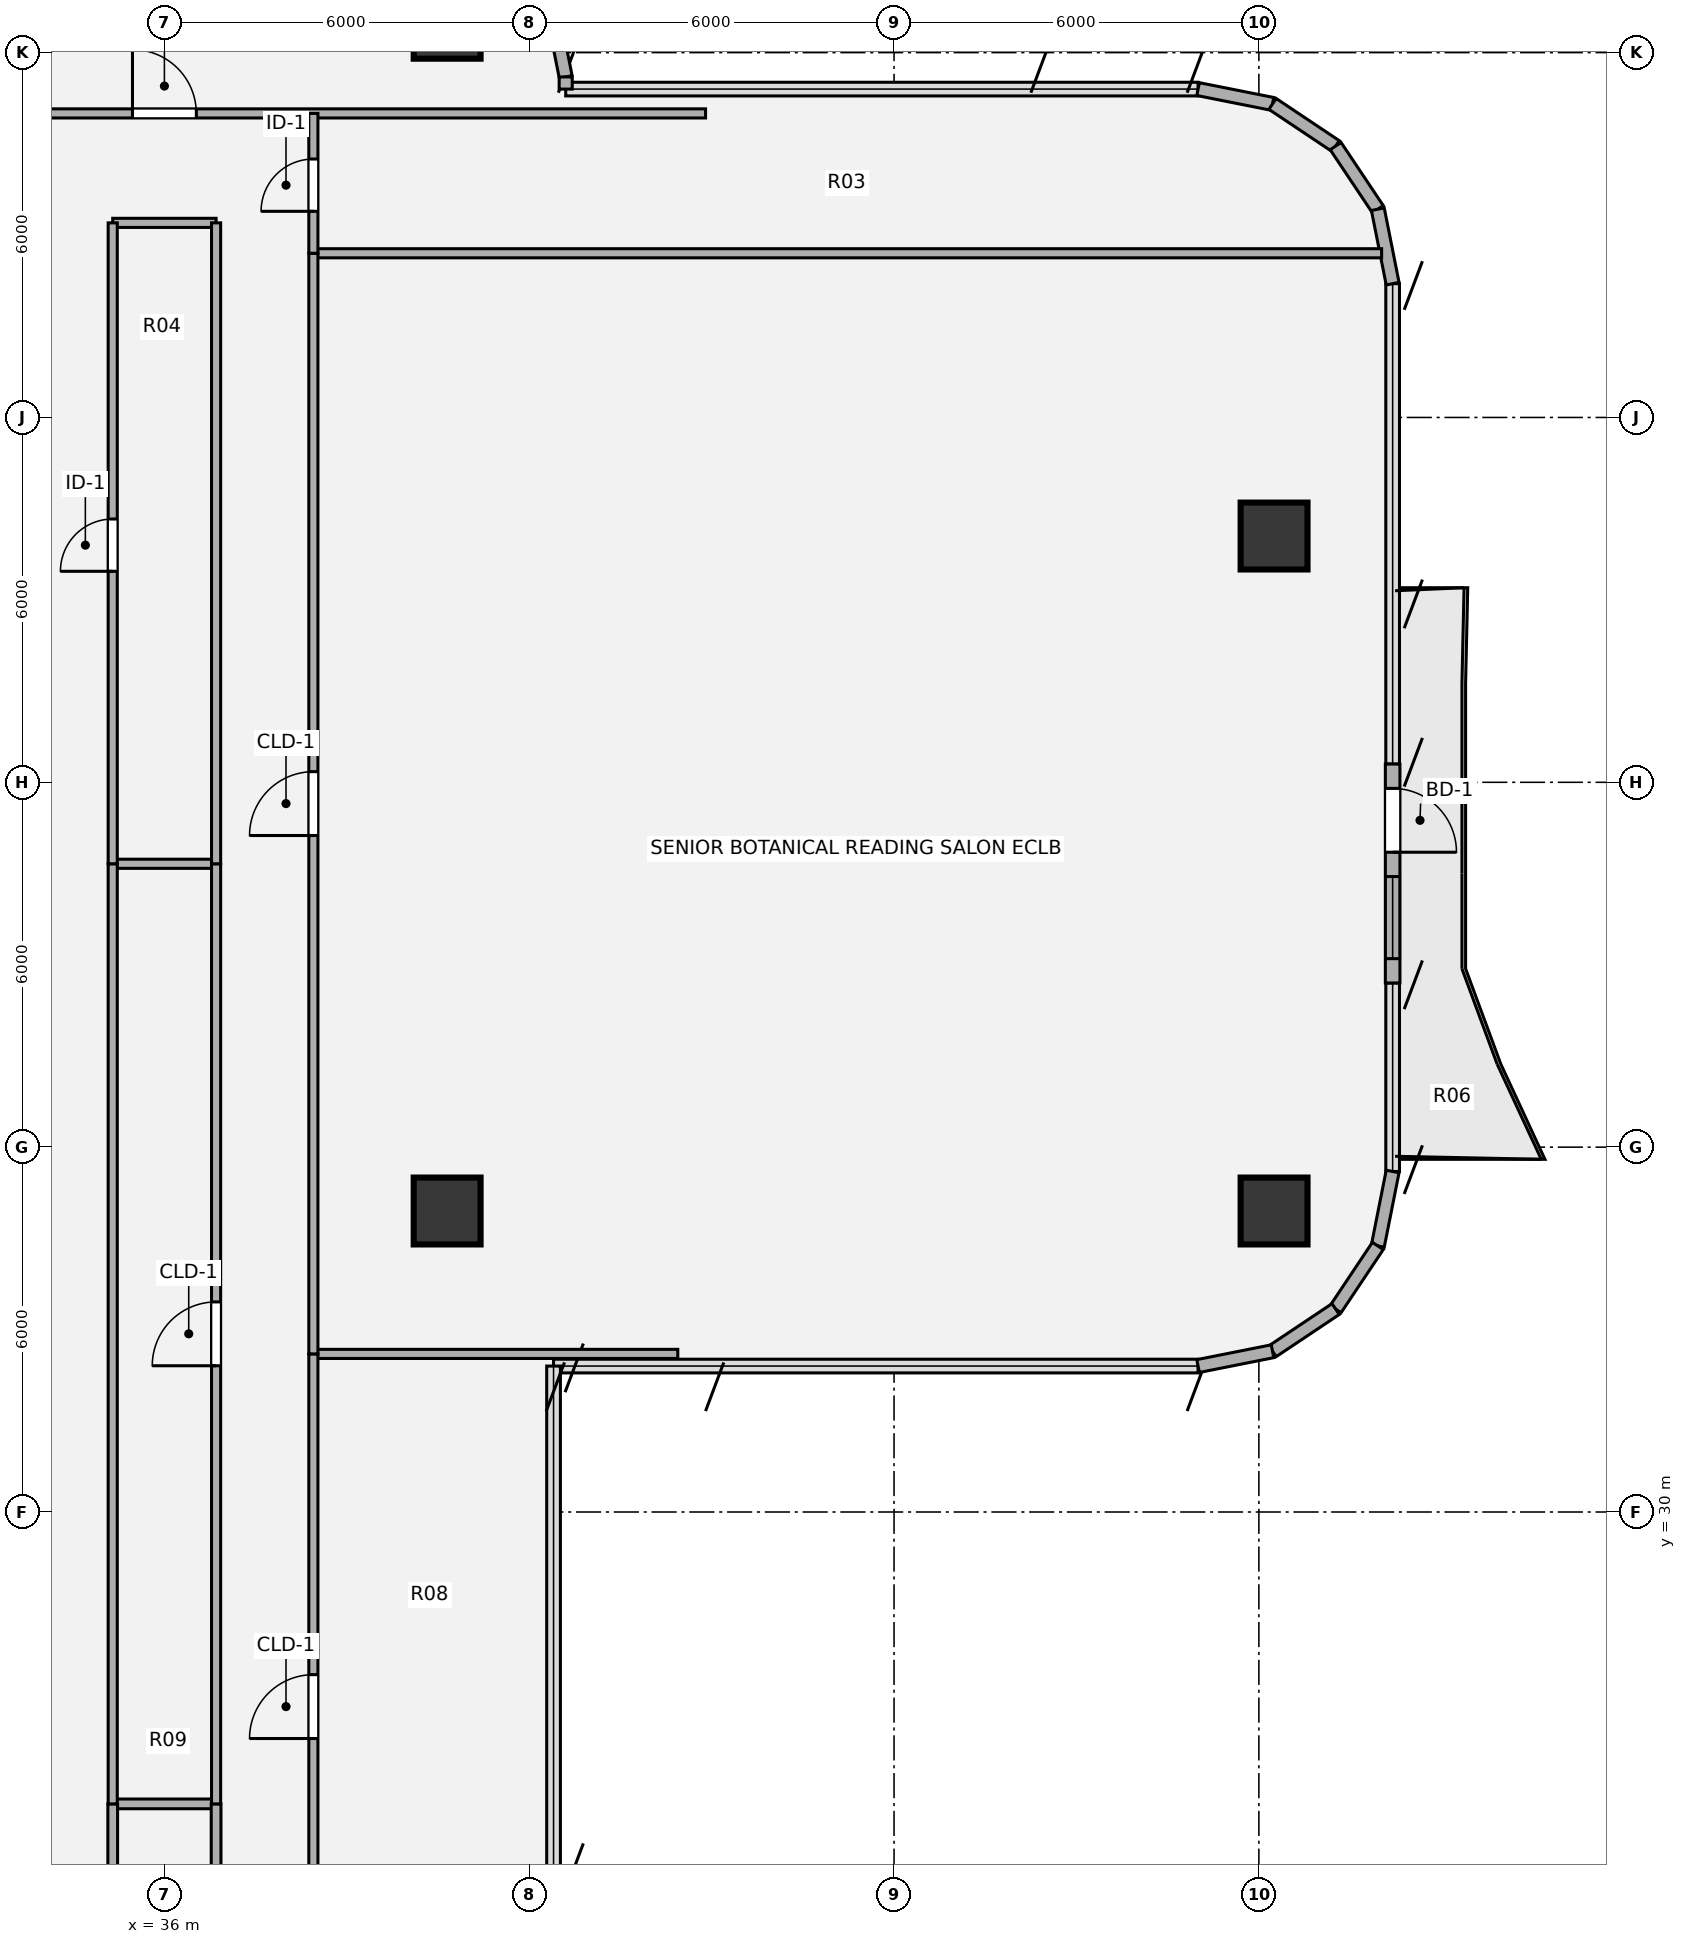
"""IFC4 building model, lengths in metres.
Left out: names, types, materials, properties, quantities, classifications, styles, units other than length and angle.
Written with IfcOpenShell. Run it as: python <this file> out.ifc"""

import sys

from ifc_helpers import new_model, si_unit, direction, frame, frame_2d, origin, origin_2d, place, context, subcontext, project, spatial, rectangle, hollow_circle, extrude, source, transform, mapped, element, fill, save


model = new_model("IFC4")
c1 = context("Model", 3, precision=1e-05, world=origin(), true_north=direction((0.0, 1.0)))
c2 = subcontext(c1, "Body", "Model", "MODEL_VIEW")
j1 = project(units=[si_unit("LENGTHUNIT", "METRE"), si_unit("PLANEANGLEUNIT", "RADIAN")], contexts=[c1])
p1 = place(None, origin())
s1 = spatial("IfcSite", under=j1, at=p1, CompositionType="ELEMENT")
p2 = place(p1, origin())
s2 = spatial("IfcBuilding", under=s1, at=p2, CompositionType="ELEMENT")
p3 = place(p2, frame((0.0, 0.0, 190.44)))
s3 = spatial("IfcBuildingStorey", under=s2, at=p3, CompositionType="ELEMENT", Elevation=190.44)
m1 = source(origin(), c2, "Body", "SweptSolid", [
    extrude(hollow_circle(Radius=0.55, WallThickness=0.04, at=origin_2d()), origin(), (0.0, 0.0, 1.0), 3.78),
])
for number, where, z_axis, x_axis in (
    (1, (54.25, 34.95, 0.0), (0.0, 0.0, 1.0), (1.0, 0.0, 0.0)),
    (2, (54.25, 46.05, 0.0), (0.0, 0.0, 1.0), (1.0, 0.0, 0.0)),
    (3, (40.65, 34.95, 0.0), (0.0, 0.0, 1.0), (1.0, 0.0, 0.0)),
    (4, (40.65, 54.45, 0.0), (0.0, 0.0, 1.0), (1.0, 0.0, 0.0)),
):
    element("IfcColumn", number, at=place(p3, frame(where, z_axis=z_axis, x_axis=x_axis)), inside=s3, PredefinedType="COLUMN", context=c2, shape_type="MappedRepresentation", body=[
        mapped(m1, transform((0.0, 0.0, 0.0), x_axis=(1.0, 0.0, 0.0), y_axis=(0.0, 1.0, 0.0), z_axis=(0.0, 0.0, 1.0), scale=1.0)),
    ])
p4 = place(p3, frame((42.387, 54.671, 0.0), z_axis=(0.0, 0.0, 1.0), x_axis=(0.195127417394, -0.980777900945, 0.0)))
e5 = element("IfcWall", 5, at=p4, inside=s3, PredefinedType="SOLIDWALL", context=c2, shape_type="SweptSolid", body=[
    extrude(rectangle(XDim=1.092, YDim=0.215, at=frame_2d((0.546, 0.0))), origin(), (0.0, 0.0, 1.0), 3.53),
])
p5 = place(p3, frame((42.6, 53.6, 0.0), z_axis=(0.0, 0.0, 1.0), x_axis=(0.0, -1.0, 0.0)))
e6 = element("IfcWall", 6, at=p5, inside=s3, PredefinedType="SOLIDWALL", context=c2, shape_type="SweptSolid", body=[
    extrude(rectangle(XDim=0.2, YDim=0.215, at=frame_2d((0.1, 0.0))), origin(), (0.0, 0.0, 1.0), 3.53),
])
for number, where, z_axis, x_axis in (
    (7, (53.0, 53.4, 0.0), (0.0, 0.0, 1.0), (0.981, -0.195, 0.0)),
    (8, (54.225, 53.156, 0.0), (0.0, 0.0, 1.0), (0.831, -0.556, 0.0)),
    (9, (55.263, 52.463, 0.0), (0.0, 0.0, 1.0), (0.556, -0.831, 0.0)),
    (10, (55.956, 51.425, 0.0), (0.0, 0.0, 1.0), (0.195, -0.981, 0.0)),
):
    element("IfcWall", number, at=place(p3, frame(where, z_axis=z_axis, x_axis=x_axis)), inside=s3, PredefinedType="SOLIDWALL", context=c2, shape_type="SweptSolid", body=[
        extrude(rectangle(XDim=1.249, YDim=0.215, at=frame_2d((0.624, 0.0))), origin(), (0.0, 0.0, 1.0), 3.53),
    ])
p6 = place(p3, frame((56.2, 42.3, 0.0), z_axis=(0.0, 0.0, 1.0), x_axis=(0.0, -1.0, 0.0)))
e11 = element("IfcWall", 11, at=p6, inside=s3, PredefinedType="SOLIDWALL", context=c2, shape_type="SweptSolid", body=[
    extrude(rectangle(XDim=3.6, YDim=0.24, at=frame_2d((1.8, 0.0))), origin(), (0.0, 0.0, 1.0), 3.53),
])
p7 = place(p6, frame((0.4, 0.0, 0.0)))
e12 = element("IfcOpeningElement", 12, at=p7, cuts=e11, PredefinedType="OPENING", context=c2, shape_type="SweptSolid", body=[
    extrude(rectangle(XDim=1.05, YDim=2.15, at=origin_2d()), frame((0.525, 0.13, 1.075), z_axis=(0.0, -1.0, 0.0), x_axis=(1.0, 0.0, 0.0)), (0.0, 0.0, 1.0), 0.26),
])
p8 = place(p6, frame((1.85, 0.0, 0.85)))
e13 = element("IfcOpeningElement", 13, at=p8, cuts=e11, PredefinedType="OPENING", context=c2, shape_type="SweptSolid", body=[
    extrude(rectangle(XDim=1.35, YDim=1.35, at=origin_2d()), frame((0.675, 0.13, 0.675), z_axis=(0.0, -1.0, 0.0), x_axis=(1.0, 0.0, 0.0)), (0.0, 0.0, 1.0), 0.26),
])
for number, where, z_axis, x_axis in (
    (14, (56.2, 35.6, 0.0), (0.0, 0.0, 1.0), (-0.195, -0.981, 0.0)),
    (15, (55.956, 34.375, 0.0), (0.0, 0.0, 1.0), (-0.556, -0.831, 0.0)),
    (16, (55.263, 33.337, 0.0), (0.0, 0.0, 1.0), (-0.831, -0.556, 0.0)),
    (17, (54.225, 32.644, 0.0), (0.0, 0.0, 1.0), (-0.981, -0.195, 0.0)),
):
    element("IfcWall", number, at=place(p3, frame(where, z_axis=z_axis, x_axis=x_axis)), inside=s3, PredefinedType="SOLIDWALL", context=c2, shape_type="SweptSolid", body=[
        extrude(rectangle(XDim=1.249, YDim=0.215, at=frame_2d((0.624, 0.0))), origin(), (0.0, 0.0, 1.0), 3.53),
    ])
p9 = place(p3, frame((35.15, 25.2, 0.0), z_axis=(0.0, 0.0, 1.0), x_axis=(1.0, 0.0, 0.0)))
e18 = element("IfcWall", 18, at=p9, inside=s3, PredefinedType="PLUMBINGWALL", context=c2, shape_type="SweptSolid", body=[
    extrude(rectangle(XDim=1.7, YDim=0.16, at=frame_2d((0.85, 0.0))), origin(), (0.0, 0.0, 1.0), 3.5),
])
p10 = place(p3, frame((38.45, 32.6, 0.0), z_axis=(0.0, 0.0, 1.0), x_axis=(1.0, 0.0, 0.0)))
e19 = element("IfcWall", 19, at=p10, inside=s3, PredefinedType="PARTITIONING", context=c2, shape_type="SweptSolid", body=[
    extrude(rectangle(XDim=5.993, YDim=0.15, at=frame_2d((2.997, 0.0))), origin(), (0.0, 0.0, 1.0), 3.5),
])
p11 = place(p3, frame((35.15, 40.66, 0.0), z_axis=(0.0, 0.0, 1.0), x_axis=(1.0, 0.0, 0.0)))
e20 = element("IfcWall", 20, at=p11, inside=s3, PredefinedType="PARTITIONING", context=c2, shape_type="SweptSolid", body=[
    extrude(rectangle(XDim=1.7, YDim=0.15, at=frame_2d((0.85, 0.0))), origin(), (0.0, 0.0, 1.0), 3.259),
])
p12 = place(p3, frame((38.45, 50.7, 0.0), z_axis=(0.0, 0.0, 1.0), x_axis=(1.0, 0.0, 0.0)))
e21 = element("IfcWall", 21, at=p12, inside=s3, PredefinedType="PARTITIONING", context=c2, shape_type="SweptSolid", body=[
    extrude(rectangle(XDim=17.569, YDim=0.15, at=frame_2d((8.785, 0.0))), origin(), (0.0, 0.0, 1.0), 3.308),
])
p13 = place(p3, frame((35.15, 51.2, 0.0), z_axis=(0.0, 0.0, 1.0), x_axis=(1.0, 0.0, 0.0)))
e22 = element("IfcWall", 22, at=p13, inside=s3, PredefinedType="PARTITIONING", context=c2, shape_type="SweptSolid", body=[
    extrude(rectangle(XDim=1.7, YDim=0.15, at=frame_2d((0.85, 0.0))), origin(), (0.0, 0.0, 1.0), 3.308),
])
p14 = place(p3, frame((27.1, 53.0, 0.0), z_axis=(0.0, 0.0, 1.0), x_axis=(1.0, 0.0, 0.0)))
e23 = element("IfcWall", 23, at=p14, inside=s3, PredefinedType="PARTITIONING", context=c2, shape_type="SweptSolid", body=[
    extrude(rectangle(XDim=17.8, YDim=0.15, at=frame_2d((8.9, 0.0))), origin(), (0.0, 0.0, 1.0), 3.308),
])
p15 = place(p14, frame((8.375, 0.0, 0.0)))
e24 = element("IfcOpeningElement", 24, at=p15, cuts=e23, PredefinedType="OPENING", context=c2, shape_type="SweptSolid", body=[
    extrude(rectangle(XDim=1.05, YDim=2.1, at=origin_2d()), frame((0.525, 0.085, 1.05), z_axis=(0.0, -1.0, 0.0), x_axis=(1.0, 0.0, 0.0)), (0.0, 0.0, 1.0), 0.17),
])
p16 = place(p3, frame((35.15, 20.2, 0.0), z_axis=(0.0, 0.0, 1.0), x_axis=(0.0, 1.0, 0.0)))
e25 = element("IfcWall", 25, at=p16, inside=s3, PredefinedType="PLUMBINGWALL", context=c2, shape_type="SweptSolid", body=[
    extrude(rectangle(XDim=5.0, YDim=0.16, at=frame_2d((2.5, 0.0))), origin(), (0.0, 0.0, 1.0), 3.5),
])
p17 = place(p16, frame((2.07, 0.0, 0.0)))
e26 = element("IfcOpeningElement", 26, at=p17, cuts=e25, PredefinedType="OPENING", context=c2, shape_type="SweptSolid", body=[
    extrude(rectangle(XDim=0.86, YDim=2.1, at=origin_2d()), frame((0.43, 0.09, 1.05), z_axis=(0.0, -1.0, 0.0), x_axis=(1.0, 0.0, 0.0)), (0.0, 0.0, 1.0), 0.18),
])
p18 = place(p3, frame((35.15, 25.2, 0.0), z_axis=(0.0, 0.0, 1.0), x_axis=(0.0, 1.0, 0.0)))
e27 = element("IfcWall", 27, at=p18, inside=s3, PredefinedType="PARTITIONING", context=c2, shape_type="SweptSolid", body=[
    extrude(rectangle(XDim=15.46, YDim=0.15, at=frame_2d((7.73, 0.0))), origin(), (0.0, 0.0, 1.0), 3.5),
])
p19 = place(p3, frame((35.15, 40.66, 0.0), z_axis=(0.0, 0.0, 1.0), x_axis=(0.0, 1.0, 0.0)))
e28 = element("IfcWall", 28, at=p19, inside=s3, PredefinedType="PARTITIONING", context=c2, shape_type="SweptSolid", body=[
    extrude(rectangle(XDim=10.54, YDim=0.15, at=frame_2d((5.27, 0.0))), origin(), (0.0, 0.0, 1.0), 3.5),
])
p20 = place(p19, frame((4.81, 0.0, 0.0)))
e29 = element("IfcOpeningElement", 29, at=p20, cuts=e28, PredefinedType="OPENING", context=c2, shape_type="SweptSolid", body=[
    extrude(rectangle(XDim=0.86, YDim=2.1, at=origin_2d()), frame((0.43, 0.085, 1.05), z_axis=(0.0, -1.0, 0.0), x_axis=(1.0, 0.0, 0.0)), (0.0, 0.0, 1.0), 0.17),
])
p21 = place(p3, frame((36.85, 20.2, 0.0), z_axis=(0.0, 0.0, 1.0), x_axis=(0.0, 1.0, 0.0)))
e30 = element("IfcWall", 30, at=p21, inside=s3, PredefinedType="PLUMBINGWALL", context=c2, shape_type="SweptSolid", body=[
    extrude(rectangle(XDim=5.0, YDim=0.16, at=frame_2d((2.5, 0.0))), origin(), (0.0, 0.0, 1.0), 3.5),
])
p22 = place(p3, frame((36.85, 25.2, 0.0), z_axis=(0.0, 0.0, 1.0), x_axis=(0.0, 1.0, 0.0)))
e31 = element("IfcWall", 31, at=p22, inside=s3, PredefinedType="PARTITIONING", context=c2, shape_type="SweptSolid", body=[
    extrude(rectangle(XDim=15.46, YDim=0.15, at=frame_2d((7.73, 0.0))), origin(), (0.0, 0.0, 1.0), 3.5),
])
p23 = place(p22, frame((7.205, 0.0, 0.0)))
e32 = element("IfcOpeningElement", 32, at=p23, cuts=e31, PredefinedType="OPENING", context=c2, shape_type="SweptSolid", body=[
    extrude(rectangle(XDim=1.05, YDim=2.1, at=origin_2d()), frame((0.525, 0.085, 1.05), z_axis=(0.0, -1.0, 0.0), x_axis=(1.0, 0.0, 0.0)), (0.0, 0.0, 1.0), 0.17),
])
p24 = place(p3, frame((36.85, 40.66, 0.0), z_axis=(0.0, 0.0, 1.0), x_axis=(0.0, 1.0, 0.0)))
e33 = element("IfcWall", 33, at=p24, inside=s3, PredefinedType="PARTITIONING", context=c2, shape_type="SweptSolid", body=[
    extrude(rectangle(XDim=10.54, YDim=0.15, at=frame_2d((5.27, 0.0))), origin(), (0.0, 0.0, 1.0), 3.5),
])
p25 = place(p3, frame((38.45, 21.2, 0.0), z_axis=(0.0, 0.0, 1.0), x_axis=(0.0, 1.0, 0.0)))
e34 = element("IfcWall", 34, at=p25, inside=s3, PredefinedType="PARTITIONING", context=c2, shape_type="SweptSolid", body=[
    extrude(rectangle(XDim=11.4, YDim=0.15, at=frame_2d((5.7, 0.0))), origin(), (0.0, 0.0, 1.0), 3.5),
])
p26 = place(p25, frame((5.075, 0.0, 0.0)))
e35 = element("IfcOpeningElement", 35, at=p26, cuts=e34, PredefinedType="OPENING", context=c2, shape_type="SweptSolid", body=[
    extrude(rectangle(XDim=1.05, YDim=2.1, at=origin_2d()), frame((0.525, 0.085, 1.05), z_axis=(0.0, -1.0, 0.0), x_axis=(1.0, 0.0, 0.0)), (0.0, 0.0, 1.0), 0.17),
])
p27 = place(p3, frame((38.45, 32.6, 0.0), z_axis=(0.0, 0.0, 1.0), x_axis=(0.0, 1.0, 0.0)))
e36 = element("IfcWall", 36, at=p27, inside=s3, PredefinedType="PARTITIONING", context=c2, shape_type="SweptSolid", body=[
    extrude(rectangle(XDim=18.1, YDim=0.15, at=frame_2d((9.05, 0.0))), origin(), (0.0, 0.0, 1.0), 3.5),
])
p28 = place(p27, frame((8.525, 0.0, 0.0)))
e37 = element("IfcOpeningElement", 37, at=p28, cuts=e36, PredefinedType="OPENING", context=c2, shape_type="SweptSolid", body=[
    extrude(rectangle(XDim=1.05, YDim=2.1, at=origin_2d()), frame((0.525, 0.085, 1.05), z_axis=(0.0, -1.0, 0.0), x_axis=(1.0, 0.0, 0.0)), (0.0, 0.0, 1.0), 0.17),
])
p29 = place(p3, frame((38.45, 50.7, 0.0), z_axis=(0.0, 0.0, 1.0), x_axis=(0.0, 1.0, 0.0)))
e38 = element("IfcWall", 38, at=p29, inside=s3, PredefinedType="PARTITIONING", context=c2, shape_type="SweptSolid", body=[
    extrude(rectangle(XDim=2.3, YDim=0.15, at=frame_2d((1.15, 0.0))), origin(), (0.0, 0.0, 1.0), 3.5),
])
p30 = place(p29, frame((0.69, 0.0, 0.0)))
e39 = element("IfcOpeningElement", 39, at=p30, cuts=e38, PredefinedType="OPENING", context=c2, shape_type="SweptSolid", body=[
    extrude(rectangle(XDim=0.86, YDim=2.1, at=origin_2d()), frame((0.43, 0.085, 1.05), z_axis=(0.0, -1.0, 0.0), x_axis=(1.0, 0.0, 0.0)), (0.0, 0.0, 1.0), 0.17),
])
m2 = source(origin(), c2, "Body", "SweptSolid", [
    extrude(rectangle(XDim=1.05, YDim=2.15, at=origin_2d()), frame((0.525, 0.025, 1.075), z_axis=(0.0, -1.0, 0.0), x_axis=(1.0, 0.0, 0.0)), (0.0, 0.0, 1.0), 0.05),
])
p31 = place(p7, origin())
e40 = element("IfcDoor", 40, at=p31, inside=s3, OperationType="SINGLE_SWING_RIGHT", PredefinedType="DOOR", context=c2, shape_type="MappedRepresentation", body=[
    mapped(m2, transform((0.0, 0.0, 0.0), x_axis=(1.0, 0.0, 0.0), y_axis=(0.0, 1.0, 0.0), z_axis=(0.0, 0.0, 1.0), scale=1.0)),
])
fill(e12, e40)
m3 = source(origin(), c2, "Body", "SweptSolid", [
    extrude(rectangle(XDim=1.35, YDim=1.35, at=origin_2d()), frame((0.675, 0.03, 0.675), z_axis=(0.0, -1.0, 0.0), x_axis=(1.0, 0.0, 0.0)), (0.0, 0.0, 1.0), 0.06),
])
p32 = place(p8, origin())
e41 = element("IfcWindow", 41, at=p32, inside=s3, PartitioningType="SINGLE_PANEL", PredefinedType="WINDOW", context=c2, shape_type="MappedRepresentation", body=[
    mapped(m3, transform((0.0, 0.0, 0.0), x_axis=(1.0, 0.0, 0.0), y_axis=(0.0, 1.0, 0.0), z_axis=(0.0, 0.0, 1.0), scale=1.0)),
])
fill(e13, e41)
m4 = source(origin(), c2, "Body", "SweptSolid", [
    extrude(rectangle(XDim=1.05, YDim=2.1, at=origin_2d()), frame((0.525, 0.025, 1.05), z_axis=(0.0, -1.0, 0.0), x_axis=(1.0, 0.0, 0.0)), (0.0, 0.0, 1.0), 0.05),
])
p33 = place(p15, origin())
e42 = element("IfcDoor", 42, at=p33, inside=s3, OperationType="SINGLE_SWING_LEFT", PredefinedType="DOOR", context=c2, shape_type="MappedRepresentation", body=[
    mapped(m4, transform((0.0, 0.0, 0.0), x_axis=(1.0, 0.0, 0.0), y_axis=(0.0, 1.0, 0.0), z_axis=(0.0, 0.0, 1.0), scale=1.0)),
])
fill(e24, e42)
m5 = source(origin(), c2, "Body", "SweptSolid", [
    extrude(rectangle(XDim=0.86, YDim=2.1, at=origin_2d()), frame((0.43, 0.025, 1.05), z_axis=(0.0, -1.0, 0.0), x_axis=(1.0, 0.0, 0.0)), (0.0, 0.0, 1.0), 0.05),
])
p34 = place(p20, origin())
e43 = element("IfcDoor", 43, at=p34, inside=s3, OperationType="SINGLE_SWING_LEFT", PredefinedType="DOOR", context=c2, shape_type="MappedRepresentation", body=[
    mapped(m5, transform((0.0, 0.0, 0.0), x_axis=(1.0, 0.0, 0.0), y_axis=(0.0, 1.0, 0.0), z_axis=(0.0, 0.0, 1.0), scale=1.0)),
])
fill(e29, e43)
p35 = place(p23, origin())
e44 = element("IfcDoor", 44, at=p35, inside=s3, OperationType="SINGLE_SWING_LEFT", PredefinedType="DOOR", context=c2, shape_type="MappedRepresentation", body=[
    mapped(m4, transform((0.0, 0.0, 0.0), x_axis=(1.0, 0.0, 0.0), y_axis=(0.0, 1.0, 0.0), z_axis=(0.0, 0.0, 1.0), scale=1.0)),
])
fill(e32, e44)
p36 = place(p26, origin())
e45 = element("IfcDoor", 45, at=p36, inside=s3, OperationType="SINGLE_SWING_LEFT", PredefinedType="DOOR", context=c2, shape_type="MappedRepresentation", body=[
    mapped(m4, transform((0.0, 0.0, 0.0), x_axis=(1.0, 0.0, 0.0), y_axis=(0.0, 1.0, 0.0), z_axis=(0.0, 0.0, 1.0), scale=1.0)),
])
fill(e35, e45)
p37 = place(p28, origin())
e46 = element("IfcDoor", 46, at=p37, inside=s3, OperationType="SINGLE_SWING_LEFT", PredefinedType="DOOR", context=c2, shape_type="MappedRepresentation", body=[
    mapped(m4, transform((0.0, 0.0, 0.0), x_axis=(1.0, 0.0, 0.0), y_axis=(0.0, 1.0, 0.0), z_axis=(0.0, 0.0, 1.0), scale=1.0)),
])
fill(e37, e46)
p38 = place(p30, origin())
e47 = element("IfcDoor", 47, at=p38, inside=s3, OperationType="SINGLE_SWING_LEFT", PredefinedType="DOOR", context=c2, shape_type="MappedRepresentation", body=[
    mapped(m5, transform((0.0, 0.0, 0.0), x_axis=(1.0, 0.0, 0.0), y_axis=(0.0, 1.0, 0.0), z_axis=(0.0, 0.0, 1.0), scale=1.0)),
])
fill(e39, e47)
save(model, sys.argv[1])
